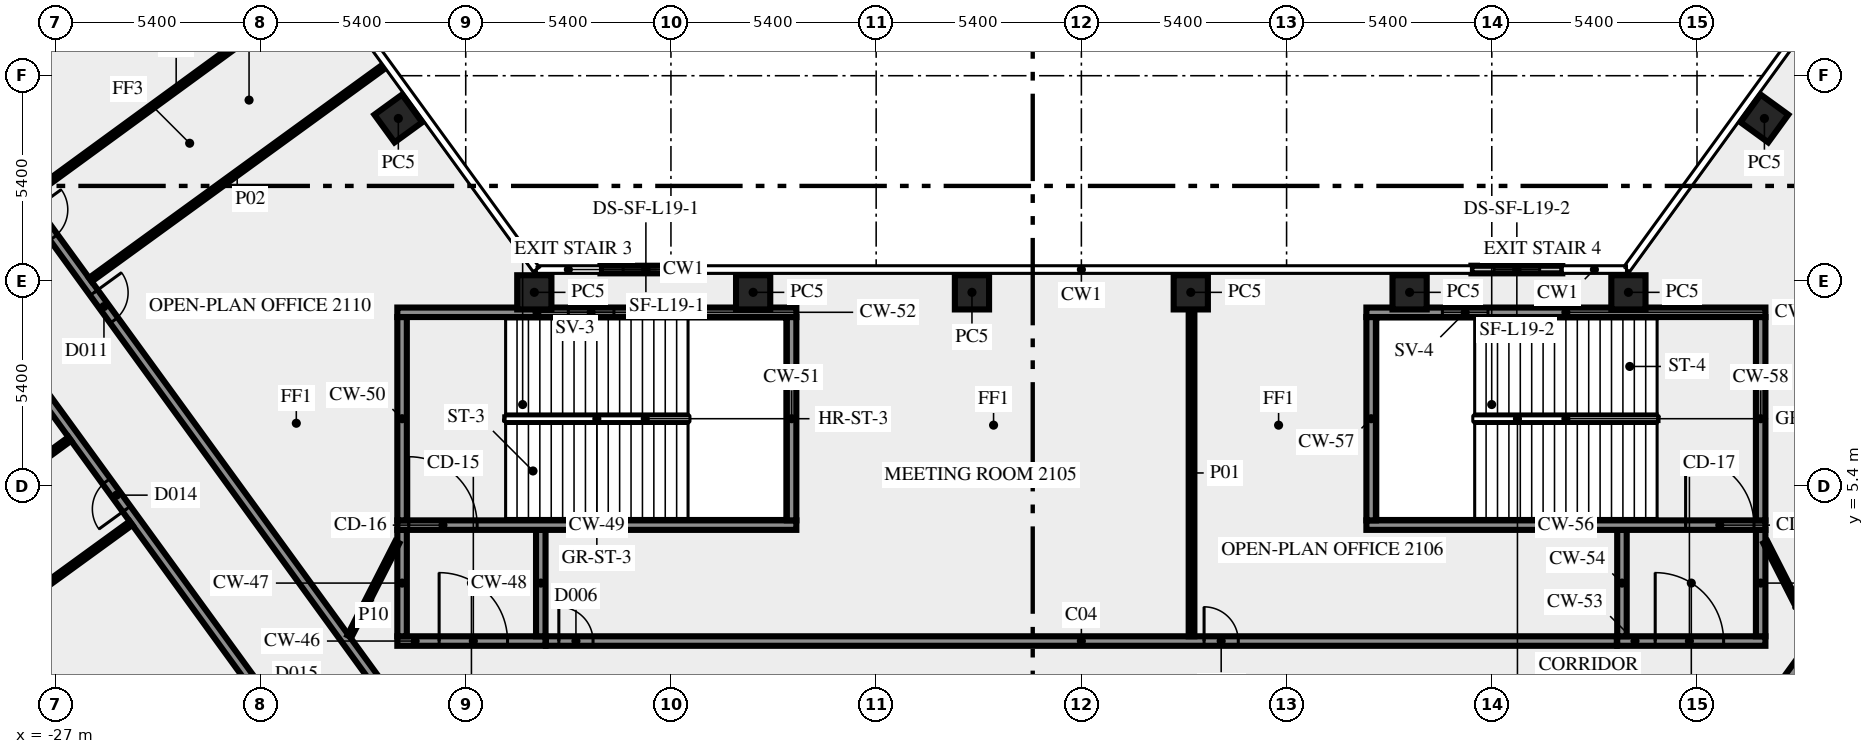
"""IFC4 building model, lengths in metres.
Left out: names, types, materials, properties, quantities, classifications, styles, units other than length and angle.
Written with IfcOpenShell. Run it as: python <this file> out.ifc"""

import sys

from ifc_helpers import new_model, si_unit, direction, frame, frame_2d, origin, origin_2d, place, context, subcontext, project, spatial, rectangle, extrude, element, fill, save


model = new_model("IFC4")
c1 = context("Model", 3, precision=1e-05, world=origin(), true_north=direction((0.0, 1.0)))
c2 = subcontext(c1, "Body", "Model", "MODEL_VIEW")
j1 = project(units=[si_unit("LENGTHUNIT", "METRE"), si_unit("PLANEANGLEUNIT", "RADIAN")], contexts=[c1])
p1 = place(None, origin())
s1 = spatial("IfcSite", under=j1, at=p1, CompositionType="ELEMENT")
p2 = place(p1, origin())
s2 = spatial("IfcBuilding", under=s1, at=p2, CompositionType="ELEMENT")
p3 = place(p2, frame((0.0, 0.0, 93.0)))
s3 = spatial("IfcBuildingStorey", under=s2, at=p3, CompositionType="ELEMENT", Elevation=93.0)
for number, where, z_axis, x_axis in (
    (1, (-17.974, 15.075, 0.0), (0.0, 0.0, 1.0), (-0.588, 0.809, 0.0)),
    (2, (17.974, 15.075, 0.0), (0.0, 0.0, 1.0), (-0.588, -0.809, 0.0)),
    (3, (14.395, 10.5, 0.0), (0.0, 0.0, 1.0), (-1.0, 0.0, 0.0)),
    (4, (8.637, 10.5, 0.0), (0.0, 0.0, 1.0), (-1.0, 0.0, 0.0)),
    (5, (2.879, 10.5, 0.0), (0.0, 0.0, 1.0), (-1.0, 0.0, 0.0)),
    (6, (-2.879, 10.5, 0.0), (0.0, 0.0, 1.0), (-1.0, 0.0, 0.0)),
    (7, (-8.637, 10.5, 0.0), (0.0, 0.0, 1.0), (-1.0, 0.0, 0.0)),
    (8, (-14.395, 10.5, 0.0), (0.0, 0.0, 1.0), (-1.0, 0.0, 0.0)),
):
    element("IfcColumn", number, at=place(p3, frame(where, z_axis=z_axis, x_axis=x_axis)), inside=s3, PredefinedType="COLUMN", context=c2, shape_type="SweptSolid", body=[
        extrude(rectangle(XDim=0.9, YDim=0.9, at=origin_2d()), origin(), (0.0, 0.0, 1.0), 3.65),
    ])
p4 = place(p3, frame((12.655, 11.1, 0.0), z_axis=(0.0, 0.0, 1.0), x_axis=(-1.0, 0.0, 0.0)))
e9 = element("IfcWall", 9, at=p4, inside=s3, PredefinedType="SOLIDWALL", context=c2, shape_type="SweptSolid", body=[
    extrude(rectangle(XDim=2.392, YDim=0.2, at=frame_2d((1.196, 0.0))), origin(), (0.0, 0.0, 1.0), 3.65),
])
p5 = place(p4, frame((0.596, 0.0, 1.0)))
e10 = element("IfcOpeningElement", 10, at=p5, cuts=e9, PredefinedType="OPENING", context=c2, shape_type="SweptSolid", body=[
    extrude(rectangle(XDim=1.2, YDim=1.2, at=frame_2d((0.6, 0.6))), frame((0.0, 0.11, 0.0), z_axis=(0.0, -1.0, 0.0), x_axis=(1.0, 0.0, 0.0)), (0.0, 0.0, 1.0), 0.22),
])
p6 = place(p3, frame((-10.263, 11.1, 0.0), z_axis=(0.0, 0.0, 1.0), x_axis=(-1.0, 0.0, 0.0)))
e11 = element("IfcWall", 11, at=p6, inside=s3, PredefinedType="SOLIDWALL", context=c2, shape_type="SweptSolid", body=[
    extrude(rectangle(XDim=2.392, YDim=0.2, at=frame_2d((1.196, 0.0))), origin(), (0.0, 0.0, 1.0), 3.65),
])
p7 = place(p6, frame((0.596, 0.0, 1.0)))
e12 = element("IfcOpeningElement", 12, at=p7, cuts=e11, PredefinedType="OPENING", context=c2, shape_type="SweptSolid", body=[
    extrude(rectangle(XDim=1.2, YDim=1.2, at=frame_2d((0.6, 0.6))), frame((0.0, 0.11, 0.0), z_axis=(0.0, -1.0, 0.0), x_axis=(1.0, 0.0, 0.0)), (0.0, 0.0, 1.0), 0.22),
])
p8 = place(p3, frame((-18.0, 1.325, 0.0), z_axis=(0.0, 0.0, 1.0), x_axis=(1.0, 0.0, 0.0)))
e13 = element("IfcWall", 13, at=p8, inside=s3, PredefinedType="SHEAR", context=c2, shape_type="SweptSolid", body=[
    extrude(rectangle(XDim=3.9, YDim=0.25, at=frame_2d((1.95, 0.0))), origin(), (0.0, 0.0, 1.0), 3.65),
])
p9 = place(p8, frame((1.1, 0.0, 0.0)))
e14 = element("IfcOpeningElement", 14, at=p9, cuts=e13, PredefinedType="OPENING", context=c2, shape_type="SweptSolid", body=[
    extrude(rectangle(XDim=1.8, YDim=2.1, at=frame_2d((0.9, 1.05))), frame((0.0, 0.135, 0.0), z_axis=(0.0, -1.0, 0.0), x_axis=(1.0, 0.0, 0.0)), (0.0, 0.0, 1.0), 0.27),
])
for number, where, z_axis, x_axis in (
    (15, (-17.875, 1.45, 0.0), (0.0, 0.0, 1.0), (0.0, 1.0, 0.0)),
    (16, (-14.225, 1.45, 0.0), (0.0, 0.0, 1.0), (0.0, 1.0, 0.0)),
):
    element("IfcWall", number, at=place(p3, frame(where, z_axis=z_axis, x_axis=x_axis)), inside=s3, PredefinedType="SHEAR", context=c2, shape_type="SweptSolid", body=[
        extrude(rectangle(XDim=2.8, YDim=0.25, at=frame_2d((1.4, 0.0))), origin(), (0.0, 0.0, 1.0), 3.65),
    ])
p10 = place(p3, frame((-18.0, 4.375, 0.0), z_axis=(0.0, 0.0, 1.0), x_axis=(1.0, 0.0, 0.0)))
e17 = element("IfcWall", 17, at=p10, inside=s3, PredefinedType="SHEAR", context=c2, shape_type="SweptSolid", body=[
    extrude(rectangle(XDim=10.5, YDim=0.25, at=frame_2d((5.25, 0.0))), origin(), (0.0, 0.0, 1.0), 3.65),
])
p11 = place(p10, frame((0.3, 0.0, 0.0)))
e18 = element("IfcOpeningElement", 18, at=p11, cuts=e17, PredefinedType="OPENING", context=c2, shape_type="SweptSolid", body=[
    extrude(rectangle(XDim=1.8, YDim=2.1, at=frame_2d((0.9, 1.05))), frame((0.0, 0.135, 0.0), z_axis=(0.0, -1.0, 0.0), x_axis=(1.0, 0.0, 0.0)), (0.0, 0.0, 1.0), 0.27),
])
for number, where, z_axis, x_axis in (
    (19, (-17.875, 4.5, 0.0), (0.0, 0.0, 1.0), (0.0, 1.0, 0.0)),
    (20, (-7.625, 4.5, 0.0), (0.0, 0.0, 1.0), (0.0, 1.0, 0.0)),
):
    element("IfcWall", number, at=place(p3, frame(where, z_axis=z_axis, x_axis=x_axis)), inside=s3, PredefinedType="SHEAR", context=c2, shape_type="SweptSolid", body=[
        extrude(rectangle(XDim=5.35, YDim=0.25, at=frame_2d((2.675, 0.0))), origin(), (0.0, 0.0, 1.0), 3.65),
    ])
p12 = place(p3, frame((-18.0, 9.975, 0.0), z_axis=(0.0, 0.0, 1.0), x_axis=(1.0, 0.0, 0.0)))
e21 = element("IfcWall", 21, at=p12, inside=s3, PredefinedType="SHEAR", context=c2, shape_type="SweptSolid", body=[
    extrude(rectangle(XDim=10.5, YDim=0.25, at=frame_2d((5.25, 0.0))), origin(), (0.0, 0.0, 1.0), 3.65),
])
p13 = place(p12, frame((4.5, 0.0, 1.0)))
e22 = element("IfcOpeningElement", 22, at=p13, cuts=e21, PredefinedType="OPENING", context=c2, shape_type="SweptSolid", body=[
    extrude(rectangle(XDim=1.2, YDim=1.2, at=frame_2d((0.6, 0.6))), frame((0.0, 0.135, 0.0), z_axis=(0.0, -1.0, 0.0), x_axis=(1.0, 0.0, 0.0)), (0.0, 0.0, 1.0), 0.27),
])
p14 = place(p3, frame((14.1, 1.325, 0.0), z_axis=(0.0, 0.0, 1.0), x_axis=(1.0, 0.0, 0.0)))
e23 = element("IfcWall", 23, at=p14, inside=s3, PredefinedType="SHEAR", context=c2, shape_type="SweptSolid", body=[
    extrude(rectangle(XDim=3.9, YDim=0.25, at=frame_2d((1.95, 0.0))), origin(), (0.0, 0.0, 1.0), 3.65),
])
p15 = place(p14, frame((1.0, 0.0, 0.0)))
e24 = element("IfcOpeningElement", 24, at=p15, cuts=e23, PredefinedType="OPENING", context=c2, shape_type="SweptSolid", body=[
    extrude(rectangle(XDim=1.8, YDim=2.1, at=frame_2d((0.9, 1.05))), frame((0.0, 0.135, 0.0), z_axis=(0.0, -1.0, 0.0), x_axis=(1.0, 0.0, 0.0)), (0.0, 0.0, 1.0), 0.27),
])
for number, where, z_axis, x_axis in (
    (25, (14.225, 1.45, 0.0), (0.0, 0.0, 1.0), (0.0, 1.0, 0.0)),
    (26, (17.875, 1.45, 0.0), (0.0, 0.0, 1.0), (0.0, 1.0, 0.0)),
):
    element("IfcWall", number, at=place(p3, frame(where, z_axis=z_axis, x_axis=x_axis)), inside=s3, PredefinedType="SHEAR", context=c2, shape_type="SweptSolid", body=[
        extrude(rectangle(XDim=2.8, YDim=0.25, at=frame_2d((1.4, 0.0))), origin(), (0.0, 0.0, 1.0), 3.65),
    ])
p16 = place(p3, frame((7.5, 4.375, 0.0), z_axis=(0.0, 0.0, 1.0), x_axis=(1.0, 0.0, 0.0)))
e27 = element("IfcWall", 27, at=p16, inside=s3, PredefinedType="SHEAR", context=c2, shape_type="SweptSolid", body=[
    extrude(rectangle(XDim=10.5, YDim=0.25, at=frame_2d((5.25, 0.0))), origin(), (0.0, 0.0, 1.0), 3.65),
])
p17 = place(p16, frame((8.4, 0.0, 0.0)))
e28 = element("IfcOpeningElement", 28, at=p17, cuts=e27, PredefinedType="OPENING", context=c2, shape_type="SweptSolid", body=[
    extrude(rectangle(XDim=1.8, YDim=2.1, at=frame_2d((0.9, 1.05))), frame((0.0, 0.135, 0.0), z_axis=(0.0, -1.0, 0.0), x_axis=(1.0, 0.0, 0.0)), (0.0, 0.0, 1.0), 0.27),
])
for number, where, z_axis, x_axis in (
    (29, (7.625, 4.5, 0.0), (0.0, 0.0, 1.0), (0.0, 1.0, 0.0)),
    (30, (17.875, 4.5, 0.0), (0.0, 0.0, 1.0), (0.0, 1.0, 0.0)),
):
    element("IfcWall", number, at=place(p3, frame(where, z_axis=z_axis, x_axis=x_axis)), inside=s3, PredefinedType="SHEAR", context=c2, shape_type="SweptSolid", body=[
        extrude(rectangle(XDim=5.35, YDim=0.25, at=frame_2d((2.675, 0.0))), origin(), (0.0, 0.0, 1.0), 3.65),
    ])
p18 = place(p3, frame((7.5, 9.975, 0.0), z_axis=(0.0, 0.0, 1.0), x_axis=(1.0, 0.0, 0.0)))
e31 = element("IfcWall", 31, at=p18, inside=s3, PredefinedType="SHEAR", context=c2, shape_type="SweptSolid", body=[
    extrude(rectangle(XDim=10.5, YDim=0.25, at=frame_2d((5.25, 0.0))), origin(), (0.0, 0.0, 1.0), 3.65),
])
p19 = place(p18, frame((2.0, 0.0, 1.0)))
e32 = element("IfcOpeningElement", 32, at=p19, cuts=e31, PredefinedType="OPENING", context=c2, shape_type="SweptSolid", body=[
    extrude(rectangle(XDim=1.2, YDim=1.2, at=frame_2d((0.6, 0.6))), frame((0.0, 0.135, 0.0), z_axis=(0.0, -1.0, 0.0), x_axis=(1.0, 0.0, 0.0)), (0.0, 0.0, 1.0), 0.27),
])
p20 = place(p3, frame((-20.531, -1.523, 0.0), z_axis=(0.0, 0.0, 1.0), x_axis=(-0.587784522481, 0.809017524614, 0.0)))
e33 = element("IfcWall", 33, at=p20, inside=s3, PredefinedType="SOLIDWALL", context=c2, shape_type="SweptSolid", body=[
    extrude(rectangle(XDim=49.912, YDim=0.25, at=frame_2d((24.956, 0.0))), origin(), (0.0, 0.0, 1.0), 3.65),
])
p21 = place(p20, frame((0.533, 0.0, 0.0)))
e34 = element("IfcOpeningElement", 34, at=p21, cuts=e33, PredefinedType="OPENING", context=c2, shape_type="SweptSolid", body=[
    extrude(rectangle(XDim=0.9, YDim=2.1, at=frame_2d((0.45, 1.05))), frame((0.0, 0.135, 0.0), z_axis=(0.0, -1.0, 0.0), x_axis=(1.0, 0.0, 0.0)), (0.0, 0.0, 1.0), 0.27),
])
p22 = place(p20, frame((48.47, 0.0, 0.0)))
e35 = element("IfcOpeningElement", 35, at=p22, cuts=e33, PredefinedType="OPENING", context=c2, shape_type="SweptSolid", body=[
    extrude(rectangle(XDim=1.0, YDim=2.1, at=frame_2d((0.5, 1.05))), frame((0.0, 0.135, 0.0), z_axis=(0.0, -1.0, 0.0), x_axis=(1.0, 0.0, 0.0)), (0.0, 0.0, 1.0), 0.27),
])
p23 = place(p20, frame((17.365, 0.0, 0.0)))
e36 = element("IfcOpeningElement", 36, at=p23, cuts=e33, PredefinedType="OPENING", context=c2, shape_type="SweptSolid", body=[
    extrude(rectangle(XDim=1.8, YDim=2.1, at=frame_2d((0.9, 1.05))), frame((0.0, 0.135, 0.0), z_axis=(0.0, -1.0, 0.0), x_axis=(1.0, 0.0, 0.0)), (0.0, 0.0, 1.0), 0.27),
])
p24 = place(p20, frame((7.816, 0.0, 0.0)))
e37 = element("IfcOpeningElement", 37, at=p24, cuts=e33, PredefinedType="OPENING", context=c2, shape_type="SweptSolid", body=[
    extrude(rectangle(XDim=0.9, YDim=2.1, at=frame_2d((0.45, 1.05))), frame((0.0, 0.135, 0.0), z_axis=(0.0, -1.0, 0.0), x_axis=(1.0, 0.0, 0.0)), (0.0, 0.0, 1.0), 0.27),
])
p25 = place(p3, frame((-37.232, 25.972, 0.0), z_axis=(0.0, 0.0, 1.0), x_axis=(0.587786323093, -0.809016216391, 0.0)))
e38 = element("IfcWall", 38, at=p25, inside=s3, PredefinedType="SOLIDWALL", context=c2, shape_type="SweptSolid", body=[
    extrude(rectangle(XDim=33.493, YDim=0.25, at=frame_2d((16.747, 0.0))), origin(), (0.0, 0.0, 1.0), 3.65),
])
p26 = place(p25, frame((19.135, 0.0, 0.0)))
e39 = element("IfcOpeningElement", 39, at=p26, cuts=e38, PredefinedType="OPENING", context=c2, shape_type="SweptSolid", body=[
    extrude(rectangle(XDim=0.9, YDim=2.1, at=frame_2d((0.45, 1.05))), frame((0.0, 0.135, 0.0), z_axis=(0.0, -1.0, 0.0), x_axis=(1.0, 0.0, 0.0)), (0.0, 0.0, 1.0), 0.27),
])
p27 = place(p25, frame((7.137, 0.0, 0.0)))
e40 = element("IfcOpeningElement", 40, at=p27, cuts=e38, PredefinedType="OPENING", context=c2, shape_type="SweptSolid", body=[
    extrude(rectangle(XDim=1.8, YDim=2.1, at=frame_2d((0.9, 1.05))), frame((0.0, 0.135, 0.0), z_axis=(0.0, -1.0, 0.0), x_axis=(1.0, 0.0, 0.0)), (0.0, 0.0, 1.0), 0.27),
])
p28 = place(p25, frame((16.435, 0.0, 0.0)))
e41 = element("IfcOpeningElement", 41, at=p28, cuts=e38, PredefinedType="OPENING", context=c2, shape_type="SweptSolid", body=[
    extrude(rectangle(XDim=0.9, YDim=2.1, at=frame_2d((0.45, 1.05))), frame((0.0, 0.135, 0.0), z_axis=(0.0, -1.0, 0.0), x_axis=(1.0, 0.0, 0.0)), (0.0, 0.0, 1.0), 0.27),
])
p29 = place(p3, frame((-14.09, 1.325, 0.0), z_axis=(0.0, 0.0, 1.0), x_axis=(1.0, 0.0, 0.0)))
e42 = element("IfcWall", 42, at=p29, inside=s3, PredefinedType="SOLIDWALL", context=c2, shape_type="SweptSolid", body=[
    extrude(rectangle(XDim=28.18, YDim=0.25, at=frame_2d((14.09, 0.0))), origin(), (0.0, 0.0, 1.0), 3.65),
])
p30 = place(p29, frame((17.319, 0.0, 0.0)))
e43 = element("IfcOpeningElement", 43, at=p30, cuts=e42, PredefinedType="OPENING", context=c2, shape_type="SweptSolid", body=[
    extrude(rectangle(XDim=0.9, YDim=2.1, at=frame_2d((0.45, 1.05))), frame((0.0, 0.135, 0.0), z_axis=(0.0, -1.0, 0.0), x_axis=(1.0, 0.0, 0.0)), (0.0, 0.0, 1.0), 0.27),
])
p31 = place(p29, frame((0.34, 0.0, 0.0)))
e44 = element("IfcOpeningElement", 44, at=p31, cuts=e42, PredefinedType="OPENING", context=c2, shape_type="SweptSolid", body=[
    extrude(rectangle(XDim=0.9, YDim=2.1, at=frame_2d((0.45, 1.05))), frame((0.0, 0.135, 0.0), z_axis=(0.0, -1.0, 0.0), x_axis=(1.0, 0.0, 0.0)), (0.0, 0.0, 1.0), 0.27),
])
p32 = place(p3, frame((17.545, -1.125, 0.0), z_axis=(0.0, 0.0, 1.0), x_axis=(0.587786330937, 0.809016210693, 0.0)))
e45 = element("IfcWall", 45, at=p32, inside=s3, PredefinedType="SOLIDWALL", context=c2, shape_type="SweptSolid", body=[
    extrude(rectangle(XDim=30.103, YDim=0.25, at=frame_2d((15.052, 0.0))), origin(), (0.0, 0.0, 1.0), 3.65),
])
p33 = place(p32, frame((28.679, 0.0, 0.0)))
e46 = element("IfcOpeningElement", 46, at=p33, cuts=e45, PredefinedType="OPENING", context=c2, shape_type="SweptSolid", body=[
    extrude(rectangle(XDim=1.0, YDim=2.1, at=frame_2d((0.5, 1.05))), frame((0.0, 0.135, 0.0), z_axis=(0.0, -1.0, 0.0), x_axis=(1.0, 0.0, 0.0)), (0.0, 0.0, 1.0), 0.27),
])
p34 = place(p32, frame((3.391, 0.0, 0.0)))
e47 = element("IfcOpeningElement", 47, at=p34, cuts=e45, PredefinedType="OPENING", context=c2, shape_type="SweptSolid", body=[
    extrude(rectangle(XDim=1.0, YDim=2.1, at=frame_2d((0.5, 1.05))), frame((0.0, 0.135, 0.0), z_axis=(0.0, -1.0, 0.0), x_axis=(1.0, 0.0, 0.0)), (0.0, 0.0, 1.0), 0.27),
])
p35 = place(p3, frame((2.899, 10.045, 0.0), z_axis=(0.0, 0.0, 1.0), x_axis=(0.0, -1.0, 0.0)))
e48 = element("IfcWall", 48, at=p35, inside=s3, PredefinedType="PARTITIONING", context=c2, shape_type="SweptSolid", body=[
    extrude(rectangle(XDim=8.595, YDim=0.15, at=frame_2d((4.297, 0.0))), origin(), (0.0, 0.0, 1.0), 3.65),
])
p36 = place(p3, frame((-18.351, 16.445, 0.0), z_axis=(0.0, 0.0, 1.0), x_axis=(-0.809052142986, -0.587736871338, 0.0)))
e49 = element("IfcWall", 49, at=p36, inside=s3, PredefinedType="PARTITIONING", context=c2, shape_type="SweptSolid", body=[
    extrude(rectangle(XDim=9.55, YDim=0.12, at=frame_2d((4.775, 0.0))), origin(), (0.0, 0.0, 1.0), 2.75),
])
p37 = place(p3, frame((-25.008, 4.427, 0.0), z_axis=(0.0, 0.0, 1.0), x_axis=(-0.808994684961, -0.587815957341, 0.0)))
e50 = element("IfcWall", 50, at=p37, inside=s3, PredefinedType="PARTITIONING", context=c2, shape_type="SweptSolid", body=[
    extrude(rectangle(XDim=9.55, YDim=0.12, at=frame_2d((4.775, 0.0))), origin(), (0.0, 0.0, 1.0), 2.75),
])
for number, where, z_axis, x_axis in (
    (51, (-27.676, 13.032, 0.0), (0.0, 0.0, 1.0), (0.808, 0.59, 0.0)),
    (52, (-34.332, 1.011, 0.0), (0.0, 0.0, 1.0), (0.808, 0.59, 0.0)),
):
    element("IfcWall", number, at=place(p3, frame(where, z_axis=z_axis, x_axis=x_axis)), inside=s3, PredefinedType="PARTITIONING", context=c2, shape_type="SweptSolid", body=[
        extrude(rectangle(XDim=9.55, YDim=0.12, at=frame_2d((4.775, 0.0))), origin(), (0.0, 0.0, 1.0), 2.75),
    ])
for number, where, z_axis, x_axis in (
    (53, (-19.261, 1.45, 0.0), (0.0, 0.0, 1.0), (0.454, 0.891, 0.0)),
    (54, (18.0, 3.925, 0.0), (0.0, 0.0, 1.0), (0.454, -0.891, 0.0)),
):
    element("IfcWall", number, at=place(p3, frame(where, z_axis=z_axis, x_axis=x_axis)), inside=s3, PredefinedType="PARTITIONING", context=c2, shape_type="SweptSolid", body=[
        extrude(rectangle(XDim=2.778, YDim=0.12, at=frame_2d((1.389, 0.0))), origin(), (0.0, 0.0, 1.0), 3.65),
    ])
p38 = place(p5, origin())
e55 = element("IfcWindow", 55, at=p38, inside=s3, PartitioningType="SINGLE_PANEL", PredefinedType="WINDOW", context=c2, shape_type="SweptSolid", body=[
    extrude(rectangle(XDim=1.2, YDim=1.2, at=frame_2d((0.6, 0.6))), frame((0.0, 0.03, 0.0), z_axis=(0.0, -1.0, 0.0), x_axis=(1.0, 0.0, 0.0)), (0.0, 0.0, 1.0), 0.06),
])
fill(e10, e55)
p39 = place(p7, origin())
e56 = element("IfcWindow", 56, at=p39, inside=s3, PartitioningType="SINGLE_PANEL", PredefinedType="WINDOW", context=c2, shape_type="SweptSolid", body=[
    extrude(rectangle(XDim=1.2, YDim=1.2, at=frame_2d((0.6, 0.6))), frame((0.0, 0.03, 0.0), z_axis=(0.0, -1.0, 0.0), x_axis=(1.0, 0.0, 0.0)), (0.0, 0.0, 1.0), 0.06),
])
fill(e12, e56)
p40 = place(p9, origin())
e57 = element("IfcDoor", 57, at=p40, inside=s3, OperationType="DOUBLE_DOOR_SINGLE_SWING", PredefinedType="DOOR", context=c2, shape_type="SweptSolid", body=[
    extrude(rectangle(XDim=1.8, YDim=2.1, at=frame_2d((0.9, 1.05))), frame((0.0, 0.025, 0.0), z_axis=(0.0, -1.0, 0.0), x_axis=(1.0, 0.0, 0.0)), (0.0, 0.0, 1.0), 0.05),
])
fill(e14, e57)
p41 = place(p11, origin())
e58 = element("IfcDoor", 58, at=p41, inside=s3, OperationType="DOUBLE_DOOR_SINGLE_SWING", PredefinedType="DOOR", context=c2, shape_type="SweptSolid", body=[
    extrude(rectangle(XDim=1.8, YDim=2.1, at=frame_2d((0.9, 1.05))), frame((0.0, 0.025, 0.0), z_axis=(0.0, -1.0, 0.0), x_axis=(1.0, 0.0, 0.0)), (0.0, 0.0, 1.0), 0.05),
])
fill(e18, e58)
p42 = place(p13, origin())
e59 = element("IfcWindow", 59, at=p42, inside=s3, PartitioningType="SINGLE_PANEL", PredefinedType="WINDOW", context=c2, shape_type="SweptSolid", body=[
    extrude(rectangle(XDim=1.2, YDim=1.2, at=frame_2d((0.6, 0.6))), frame((0.0, 0.03, 0.0), z_axis=(0.0, -1.0, 0.0), x_axis=(1.0, 0.0, 0.0)), (0.0, 0.0, 1.0), 0.06),
])
fill(e22, e59)
p43 = place(p15, origin())
e60 = element("IfcDoor", 60, at=p43, inside=s3, OperationType="DOUBLE_DOOR_SINGLE_SWING", PredefinedType="DOOR", context=c2, shape_type="SweptSolid", body=[
    extrude(rectangle(XDim=1.8, YDim=2.1, at=frame_2d((0.9, 1.05))), frame((0.0, 0.025, 0.0), z_axis=(0.0, -1.0, 0.0), x_axis=(1.0, 0.0, 0.0)), (0.0, 0.0, 1.0), 0.05),
])
fill(e24, e60)
p44 = place(p17, origin())
e61 = element("IfcDoor", 61, at=p44, inside=s3, OperationType="DOUBLE_DOOR_SINGLE_SWING", PredefinedType="DOOR", context=c2, shape_type="SweptSolid", body=[
    extrude(rectangle(XDim=1.8, YDim=2.1, at=frame_2d((0.9, 1.05))), frame((0.0, 0.025, 0.0), z_axis=(0.0, -1.0, 0.0), x_axis=(1.0, 0.0, 0.0)), (0.0, 0.0, 1.0), 0.05),
])
fill(e28, e61)
p45 = place(p19, origin())
e62 = element("IfcWindow", 62, at=p45, inside=s3, PartitioningType="SINGLE_PANEL", PredefinedType="WINDOW", context=c2, shape_type="SweptSolid", body=[
    extrude(rectangle(XDim=1.2, YDim=1.2, at=frame_2d((0.6, 0.6))), frame((0.0, 0.03, 0.0), z_axis=(0.0, -1.0, 0.0), x_axis=(1.0, 0.0, 0.0)), (0.0, 0.0, 1.0), 0.06),
])
fill(e32, e62)
p46 = place(p30, origin())
e63 = element("IfcDoor", 63, at=p46, inside=s3, OperationType="SINGLE_SWING_LEFT", PredefinedType="DOOR", context=c2, shape_type="SweptSolid", body=[
    extrude(rectangle(XDim=0.9, YDim=2.1, at=frame_2d((0.45, 1.05))), frame((0.0, 0.025, 0.0), z_axis=(0.0, -1.0, 0.0), x_axis=(1.0, 0.0, 0.0)), (0.0, 0.0, 1.0), 0.05),
])
fill(e43, e63)
p47 = place(p26, origin())
e64 = element("IfcDoor", 64, at=p47, inside=s3, OperationType="SINGLE_SWING_LEFT", PredefinedType="DOOR", context=c2, shape_type="SweptSolid", body=[
    extrude(rectangle(XDim=0.9, YDim=2.1, at=frame_2d((0.45, 1.05))), frame((0.0, 0.025, 0.0), z_axis=(0.0, -1.0, 0.0), x_axis=(1.0, 0.0, 0.0)), (0.0, 0.0, 1.0), 0.05),
])
fill(e39, e64)
p48 = place(p31, origin())
e65 = element("IfcDoor", 65, at=p48, inside=s3, OperationType="SINGLE_SWING_LEFT", PredefinedType="DOOR", context=c2, shape_type="SweptSolid", body=[
    extrude(rectangle(XDim=0.9, YDim=2.1, at=frame_2d((0.45, 1.05))), frame((0.0, 0.025, 0.0), z_axis=(0.0, -1.0, 0.0), x_axis=(1.0, 0.0, 0.0)), (0.0, 0.0, 1.0), 0.05),
])
fill(e44, e65)
p49 = place(p28, origin())
e66 = element("IfcDoor", 66, at=p49, inside=s3, OperationType="SINGLE_SWING_LEFT", PredefinedType="DOOR", context=c2, shape_type="SweptSolid", body=[
    extrude(rectangle(XDim=0.9, YDim=2.1, at=frame_2d((0.45, 1.05))), frame((0.0, 0.025, 0.0), z_axis=(0.0, -1.0, 0.0), x_axis=(1.0, 0.0, 0.0)), (0.0, 0.0, 1.0), 0.05),
])
fill(e41, e66)
p50 = place(p24, origin())
e67 = element("IfcDoor", 67, at=p50, inside=s3, OperationType="SINGLE_SWING_LEFT", PredefinedType="DOOR", context=c2, shape_type="SweptSolid", body=[
    extrude(rectangle(XDim=0.9, YDim=2.1, at=frame_2d((0.45, 1.05))), frame((0.0, 0.025, 0.0), z_axis=(0.0, -1.0, 0.0), x_axis=(1.0, 0.0, 0.0)), (0.0, 0.0, 1.0), 0.05),
])
fill(e37, e67)
save(model, sys.argv[1])
